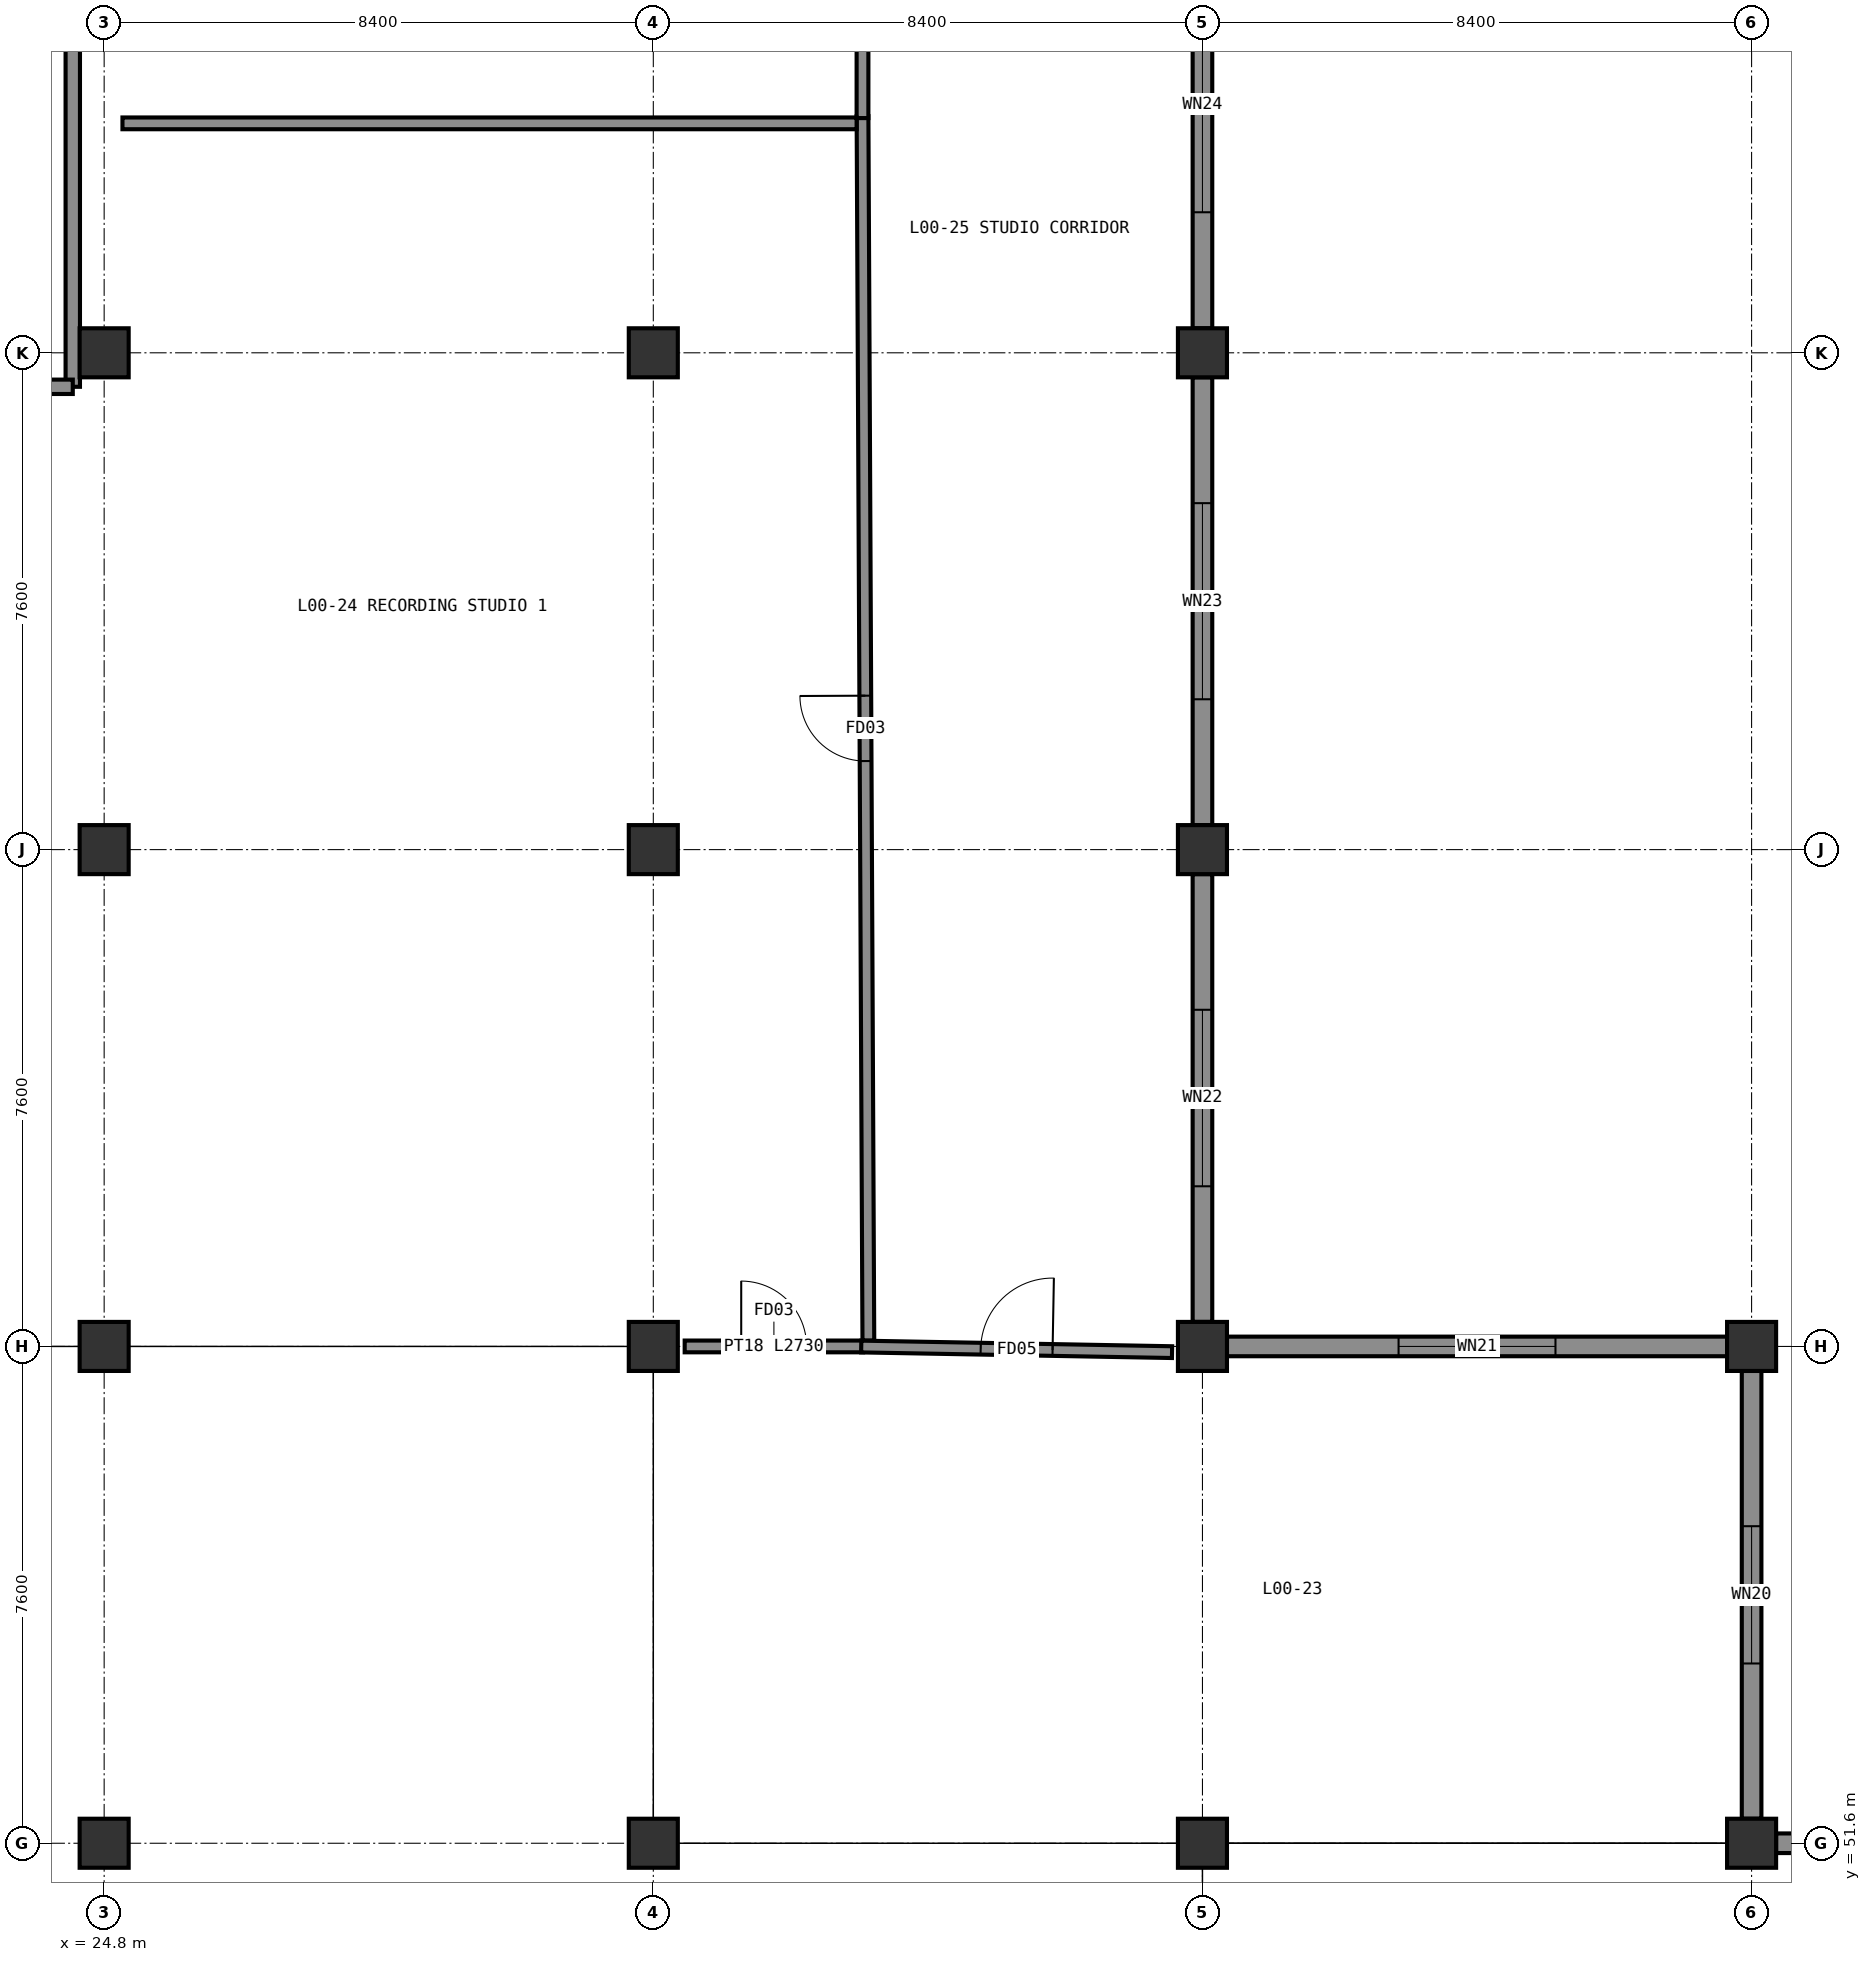
"""IFC4 building model, lengths in metres.
Left out: names, types, materials, properties, quantities, classifications, styles, units other than length and angle.
Written with IfcOpenShell. Run it as: python <this file> out.ifc"""

import sys

from ifc_helpers import new_model, si_unit, direction, frame, frame_2d, origin, origin_2d, place, context, subcontext, project, spatial, rectangle, extrude, element, fill, save


model = new_model("IFC4")
c1 = context("Model", 3, precision=1e-05, world=origin(), true_north=direction((0.0, 1.0)))
c2 = subcontext(c1, "Body", "Model", "MODEL_VIEW")
j1 = project(units=[si_unit("LENGTHUNIT", "METRE"), si_unit("PLANEANGLEUNIT", "RADIAN")], contexts=[c1])
p1 = place(None, origin())
s1 = spatial("IfcSite", under=j1, at=p1, CompositionType="ELEMENT")
p2 = place(p1, origin())
s2 = spatial("IfcBuilding", under=s1, at=p2, CompositionType="ELEMENT")
p3 = place(p2, origin())
s3 = spatial("IfcBuildingStorey", under=s2, at=p3, CompositionType="ELEMENT", Elevation=0.0)
for number, where, z_axis, x_axis in (
    (1, (24.8, 51.6, 0.0), (0.0, 0.0, 1.0), (1.0, 0.0, 0.0)),
    (2, (33.2, 51.6, 0.0), (0.0, 0.0, 1.0), (1.0, 0.0, 0.0)),
    (3, (41.6, 51.6, 0.0), (0.0, 0.0, 1.0), (1.0, 0.0, 0.0)),
    (4, (50.0, 51.6, 0.0), (0.0, 0.0, 1.0), (1.0, 0.0, 0.0)),
    (5, (24.8, 59.2, 0.0), (0.0, 0.0, 1.0), (1.0, 0.0, 0.0)),
    (6, (33.2, 59.2, 0.0), (0.0, 0.0, 1.0), (1.0, 0.0, 0.0)),
    (7, (41.6, 59.2, 0.0), (0.0, 0.0, 1.0), (1.0, 0.0, 0.0)),
    (8, (50.0, 59.2, 0.0), (0.0, 0.0, 1.0), (1.0, 0.0, 0.0)),
    (9, (24.8, 66.8, 0.0), (0.0, 0.0, 1.0), (1.0, 0.0, 0.0)),
    (10, (33.2, 66.8, 0.0), (0.0, 0.0, 1.0), (1.0, 0.0, 0.0)),
    (11, (41.6, 66.8, 0.0), (0.0, 0.0, 1.0), (1.0, 0.0, 0.0)),
    (12, (24.8, 74.4, 0.0), (0.0, 0.0, 1.0), (1.0, 0.0, 0.0)),
    (13, (33.2, 74.4, 0.0), (0.0, 0.0, 1.0), (1.0, 0.0, 0.0)),
    (14, (41.6, 74.4, 0.0), (0.0, 0.0, 1.0), (1.0, 0.0, 0.0)),
):
    element("IfcColumn", number, at=place(p3, frame(where, z_axis=z_axis, x_axis=x_axis)), inside=s3, PredefinedType="COLUMN", context=c2, shape_type="SweptSolid", body=[
        extrude(rectangle(XDim=0.75, YDim=0.75, at=origin_2d()), origin(), (0.0, 0.0, 1.0), 4.8),
    ])
p4 = place(p3, frame((58.025, 51.6, 0.0), z_axis=(0.0, 0.0, 1.0), x_axis=(-1.0, 0.0, 0.0)))
e15 = element("IfcWall", 15, at=p4, inside=s3, PredefinedType="SOLIDWALL", context=c2, shape_type="SweptSolid", body=[
    extrude(rectangle(XDim=7.65, YDim=0.3, at=frame_2d((3.825, 0.0))), origin(), (0.0, 0.0, 1.0), 4.047),
])
p5 = place(p4, frame((2.925, 0.0, 0.95)))
e16 = element("IfcOpeningElement", 16, at=p5, cuts=e15, PredefinedType="OPENING", context=c2, shape_type="SweptSolid", body=[
    extrude(rectangle(XDim=1.8, YDim=2.1, at=frame_2d((0.9, 1.05))), frame((0.0, 0.16, 0.0), z_axis=(0.0, -1.0, 0.0), x_axis=(1.0, 0.0, 0.0)), (0.0, 0.0, 1.0), 0.32),
])
p6 = place(p3, frame((50.0, 51.975, 0.0), z_axis=(0.0, 0.0, 1.0), x_axis=(0.0, 1.0, 0.0)))
e17 = element("IfcWall", 17, at=p6, inside=s3, PredefinedType="SOLIDWALL", context=c2, shape_type="SweptSolid", body=[
    extrude(rectangle(XDim=6.85, YDim=0.3, at=frame_2d((3.425, 0.0))), origin(), (0.0, 0.0, 1.0), 4.5),
])
p7 = place(p6, frame((2.375, 0.0, 0.95)))
e18 = element("IfcOpeningElement", 18, at=p7, cuts=e17, PredefinedType="OPENING", context=c2, shape_type="SweptSolid", body=[
    extrude(rectangle(XDim=2.1, YDim=2.1, at=frame_2d((1.05, 1.05))), frame((0.0, 0.16, 0.0), z_axis=(0.0, -1.0, 0.0), x_axis=(1.0, 0.0, 0.0)), (0.0, 0.0, 1.0), 0.32),
])
p8 = place(p3, frame((49.625, 59.2, 0.0), z_axis=(0.0, 0.0, 1.0), x_axis=(-1.0, 0.0, 0.0)))
e19 = element("IfcWall", 19, at=p8, inside=s3, PredefinedType="SOLIDWALL", context=c2, shape_type="SweptSolid", body=[
    extrude(rectangle(XDim=7.65, YDim=0.3, at=frame_2d((3.825, 0.0))), origin(), (0.0, 0.0, 1.0), 4.5),
])
p9 = place(p8, frame((2.625, 0.0, 0.95)))
e20 = element("IfcOpeningElement", 20, at=p9, cuts=e19, PredefinedType="OPENING", context=c2, shape_type="SweptSolid", body=[
    extrude(rectangle(XDim=2.4, YDim=2.1, at=frame_2d((1.2, 1.05))), frame((0.0, 0.16, 0.0), z_axis=(0.0, -1.0, 0.0), x_axis=(1.0, 0.0, 0.0)), (0.0, 0.0, 1.0), 0.32),
])
p10 = place(p3, frame((41.6, 59.575, 0.0), z_axis=(0.0, 0.0, 1.0), x_axis=(0.0, 1.0, 0.0)))
e21 = element("IfcWall", 21, at=p10, inside=s3, PredefinedType="SOLIDWALL", context=c2, shape_type="SweptSolid", body=[
    extrude(rectangle(XDim=6.85, YDim=0.3, at=frame_2d((3.425, 0.0))), origin(), (0.0, 0.0, 1.0), 4.5),
])
p11 = place(p10, frame((2.075, 0.0, 0.95)))
e22 = element("IfcOpeningElement", 22, at=p11, cuts=e21, PredefinedType="OPENING", context=c2, shape_type="SweptSolid", body=[
    extrude(rectangle(XDim=2.7, YDim=2.1, at=frame_2d((1.35, 1.05))), frame((0.0, 0.16, 0.0), z_axis=(0.0, -1.0, 0.0), x_axis=(1.0, 0.0, 0.0)), (0.0, 0.0, 1.0), 0.32),
])
p12 = place(p3, frame((41.6, 67.175, 0.0), z_axis=(0.0, 0.0, 1.0), x_axis=(0.0, 1.0, 0.0)))
e23 = element("IfcWall", 23, at=p12, inside=s3, PredefinedType="SOLIDWALL", context=c2, shape_type="SweptSolid", body=[
    extrude(rectangle(XDim=6.85, YDim=0.3, at=frame_2d((3.425, 0.0))), origin(), (0.0, 0.0, 1.0), 4.5),
])
p13 = place(p12, frame((1.925, 0.0, 0.95)))
e24 = element("IfcOpeningElement", 24, at=p13, cuts=e23, PredefinedType="OPENING", context=c2, shape_type="SweptSolid", body=[
    extrude(rectangle(XDim=3.0, YDim=2.1, at=frame_2d((1.5, 1.05))), frame((0.0, 0.16, 0.0), z_axis=(0.0, -1.0, 0.0), x_axis=(1.0, 0.0, 0.0)), (0.0, 0.0, 1.0), 0.32),
])
p14 = place(p3, frame((41.6, 74.775, 0.0), z_axis=(0.0, 0.0, 1.0), x_axis=(0.0, 1.0, 0.0)))
e25 = element("IfcWall", 25, at=p14, inside=s3, PredefinedType="SOLIDWALL", context=c2, shape_type="SweptSolid", body=[
    extrude(rectangle(XDim=6.85, YDim=0.3, at=frame_2d((3.425, 0.0))), origin(), (0.0, 0.0, 1.0), 4.5),
])
p15 = place(p14, frame((1.775, 0.0, 0.95)))
e26 = element("IfcOpeningElement", 26, at=p15, cuts=e25, PredefinedType="OPENING", context=c2, shape_type="SweptSolid", body=[
    extrude(rectangle(XDim=3.3, YDim=2.1, at=frame_2d((1.65, 1.05))), frame((0.0, 0.16, 0.0), z_axis=(0.0, -1.0, 0.0), x_axis=(1.0, 0.0, 0.0)), (0.0, 0.0, 1.0), 0.32),
])
p16 = place(p3, frame((24.32, 73.88, 0.0), z_axis=(0.0, 0.0, 1.0), x_axis=(0.0, 1.0, 0.0)))
e27 = element("IfcWall", 27, at=p16, inside=s3, PredefinedType="SOLIDWALL", context=c2, shape_type="SweptSolid", body=[
    extrude(rectangle(XDim=45.87, YDim=0.22, at=frame_2d((22.935, 0.0))), origin(), (0.0, 0.0, 1.0), 4.5),
])
p17 = place(p3, frame((17.48, 73.88, 0.0), z_axis=(0.0, 0.0, 1.0), x_axis=(1.0, 0.0, 0.0)))
e28 = element("IfcWall", 28, at=p17, inside=s3, PredefinedType="SOLIDWALL", context=c2, shape_type="SweptSolid", body=[
    extrude(rectangle(XDim=6.84, YDim=0.22, at=frame_2d((3.42, 0.0))), origin(), (0.0, 0.0, 1.0), 4.5),
])
p18 = place(p3, frame((33.68, 59.2, 0.0), z_axis=(0.0, 0.0, 1.0), x_axis=(1.0, 0.0, 0.0)))
e29 = element("IfcWall", 29, at=p18, inside=s3, PredefinedType="PARTITIONING", context=c2, shape_type="SweptSolid", body=[
    extrude(rectangle(XDim=2.729, YDim=0.18, at=frame_2d((1.365, 0.0))), origin(), (0.0, 0.0, 1.0), 4.5),
])
p19 = place(p18, frame((0.865, 0.0, 0.0)))
e30 = element("IfcOpeningElement", 30, at=p19, cuts=e29, PredefinedType="OPENING", context=c2, shape_type="SweptSolid", body=[
    extrude(rectangle(XDim=1.0, YDim=2.1, at=frame_2d((0.5, 1.05))), frame((0.0, 0.1, 0.0), z_axis=(0.0, -1.0, 0.0), x_axis=(1.0, 0.0, 0.0)), (0.0, 0.0, 1.0), 0.2),
])
p20 = place(p3, frame((36.49, 59.29, 0.0), z_axis=(0.0, 0.0, 1.0), x_axis=(-0.004757754169, 0.999988681824, 0.0)))
e31 = element("IfcWall", 31, at=p20, inside=s3, PredefinedType="PARTITIONING", context=c2, shape_type="SweptSolid", body=[
    extrude(rectangle(XDim=18.73, YDim=0.18, at=frame_2d((9.365, 0.0))), origin(), (0.0, 0.0, 1.0), 4.5),
])
p21 = place(p20, frame((8.865, 0.0, 0.0)))
e32 = element("IfcOpeningElement", 32, at=p21, cuts=e31, PredefinedType="OPENING", context=c2, shape_type="SweptSolid", body=[
    extrude(rectangle(XDim=1.0, YDim=2.1, at=frame_2d((0.5, 1.05))), frame((0.0, 0.1, 0.0), z_axis=(0.0, -1.0, 0.0), x_axis=(1.0, 0.0, 0.0)), (0.0, 0.0, 1.0), 0.2),
])
p22 = place(p3, frame((36.4, 77.99, 0.0), z_axis=(0.0, 0.0, 1.0), x_axis=(0.0, 1.0, 0.0)))
e33 = element("IfcWall", 33, at=p22, inside=s3, PredefinedType="PARTITIONING", context=c2, shape_type="SweptSolid", body=[
    extrude(rectangle(XDim=19.229, YDim=0.18, at=frame_2d((9.615, 0.0))), origin(), (0.0, 0.0, 1.0), 4.5),
])
p23 = place(p22, frame((9.09, 0.0, 0.0)))
e34 = element("IfcOpeningElement", 34, at=p23, cuts=e33, PredefinedType="OPENING", context=c2, shape_type="SweptSolid", body=[
    extrude(rectangle(XDim=1.05, YDim=2.1, at=frame_2d((0.525, 1.05))), frame((0.0, 0.1, 0.0), z_axis=(0.0, -1.0, 0.0), x_axis=(1.0, 0.0, 0.0)), (0.0, 0.0, 1.0), 0.2),
])
p24 = place(p3, frame((36.381, 59.198, 0.0), z_axis=(0.0, 0.0, 1.0), x_axis=(0.9998376067, -0.018021105061, 0.0)))
e35 = element("IfcWall", 35, at=p24, inside=s3, PredefinedType="PARTITIONING", context=c2, shape_type="SweptSolid", body=[
    extrude(rectangle(XDim=4.755, YDim=0.18, at=frame_2d((2.377, 0.0))), origin(), (0.0, 0.0, 1.0), 4.5),
])
p25 = place(p24, frame((1.828, 0.0, 0.0)))
e36 = element("IfcOpeningElement", 36, at=p25, cuts=e35, PredefinedType="OPENING", context=c2, shape_type="SweptSolid", body=[
    extrude(rectangle(XDim=1.1, YDim=2.1, at=frame_2d((0.55, 1.05))), frame((0.0, 0.1, 0.0), z_axis=(0.0, -1.0, 0.0), x_axis=(1.0, 0.0, 0.0)), (0.0, 0.0, 1.0), 0.2),
])
p26 = place(p3, frame((25.08, 77.91, 0.0), z_axis=(0.0, 0.0, 1.0), x_axis=(1.0, 0.0, 0.0)))
e37 = element("IfcWall", 37, at=p26, inside=s3, PredefinedType="PARTITIONING", context=c2, shape_type="SweptSolid", body=[
    extrude(rectangle(XDim=11.23, YDim=0.18, at=frame_2d((5.615, 0.0))), origin(), (0.0, 0.0, 1.0), 4.5),
])
p27 = place(p7, origin())
e38 = element("IfcWindow", 38, at=p27, inside=s3, PartitioningType="DOUBLE_PANEL_VERTICAL", PredefinedType="WINDOW", context=c2, shape_type="SweptSolid", body=[
    extrude(rectangle(XDim=2.1, YDim=2.1, at=frame_2d((1.05, 1.05))), frame((0.0, 0.03, 0.0), z_axis=(0.0, -1.0, 0.0), x_axis=(1.0, 0.0, 0.0)), (0.0, 0.0, 1.0), 0.06),
])
fill(e18, e38)
p28 = place(p9, origin())
e39 = element("IfcWindow", 39, at=p28, inside=s3, PartitioningType="DOUBLE_PANEL_VERTICAL", PredefinedType="WINDOW", context=c2, shape_type="SweptSolid", body=[
    extrude(rectangle(XDim=2.4, YDim=2.1, at=frame_2d((1.2, 1.05))), frame((0.0, 0.03, 0.0), z_axis=(0.0, -1.0, 0.0), x_axis=(1.0, 0.0, 0.0)), (0.0, 0.0, 1.0), 0.06),
])
fill(e20, e39)
p29 = place(p11, origin())
e40 = element("IfcWindow", 40, at=p29, inside=s3, PartitioningType="DOUBLE_PANEL_VERTICAL", PredefinedType="WINDOW", context=c2, shape_type="SweptSolid", body=[
    extrude(rectangle(XDim=2.7, YDim=2.1, at=frame_2d((1.35, 1.05))), frame((0.0, 0.03, 0.0), z_axis=(0.0, -1.0, 0.0), x_axis=(1.0, 0.0, 0.0)), (0.0, 0.0, 1.0), 0.06),
])
fill(e22, e40)
p30 = place(p13, origin())
e41 = element("IfcWindow", 41, at=p30, inside=s3, PartitioningType="DOUBLE_PANEL_VERTICAL", PredefinedType="WINDOW", context=c2, shape_type="SweptSolid", body=[
    extrude(rectangle(XDim=3.0, YDim=2.1, at=frame_2d((1.5, 1.05))), frame((0.0, 0.03, 0.0), z_axis=(0.0, -1.0, 0.0), x_axis=(1.0, 0.0, 0.0)), (0.0, 0.0, 1.0), 0.06),
])
fill(e24, e41)
p31 = place(p15, origin())
e42 = element("IfcWindow", 42, at=p31, inside=s3, PartitioningType="DOUBLE_PANEL_VERTICAL", PredefinedType="WINDOW", context=c2, shape_type="SweptSolid", body=[
    extrude(rectangle(XDim=3.3, YDim=2.1, at=frame_2d((1.65, 1.05))), frame((0.0, 0.03, 0.0), z_axis=(0.0, -1.0, 0.0), x_axis=(1.0, 0.0, 0.0)), (0.0, 0.0, 1.0), 0.06),
])
fill(e26, e42)
p32 = place(p19, origin())
e43 = element("IfcDoor", 43, at=p32, inside=s3, OperationType="SINGLE_SWING_LEFT", PredefinedType="DOOR", context=c2, shape_type="SweptSolid", body=[
    extrude(rectangle(XDim=1.0, YDim=2.1, at=frame_2d((0.5, 1.05))), frame((0.0, 0.025, 0.0), z_axis=(0.0, -1.0, 0.0), x_axis=(1.0, 0.0, 0.0)), (0.0, 0.0, 1.0), 0.05),
])
fill(e30, e43)
p33 = place(p21, origin())
e44 = element("IfcDoor", 44, at=p33, inside=s3, OperationType="SINGLE_SWING_RIGHT", PredefinedType="DOOR", context=c2, shape_type="SweptSolid", body=[
    extrude(rectangle(XDim=1.0, YDim=2.1, at=frame_2d((0.5, 1.05))), frame((0.0, 0.025, 0.0), z_axis=(0.0, -1.0, 0.0), x_axis=(1.0, 0.0, 0.0)), (0.0, 0.0, 1.0), 0.05),
])
fill(e32, e44)
p34 = place(p25, origin())
e45 = element("IfcDoor", 45, at=p34, inside=s3, OperationType="SINGLE_SWING_RIGHT", PredefinedType="DOOR", context=c2, shape_type="SweptSolid", body=[
    extrude(rectangle(XDim=1.1, YDim=2.1, at=frame_2d((0.55, 1.05))), frame((0.0, 0.025, 0.0), z_axis=(0.0, -1.0, 0.0), x_axis=(1.0, 0.0, 0.0)), (0.0, 0.0, 1.0), 0.05),
])
fill(e36, e45)
save(model, sys.argv[1])
